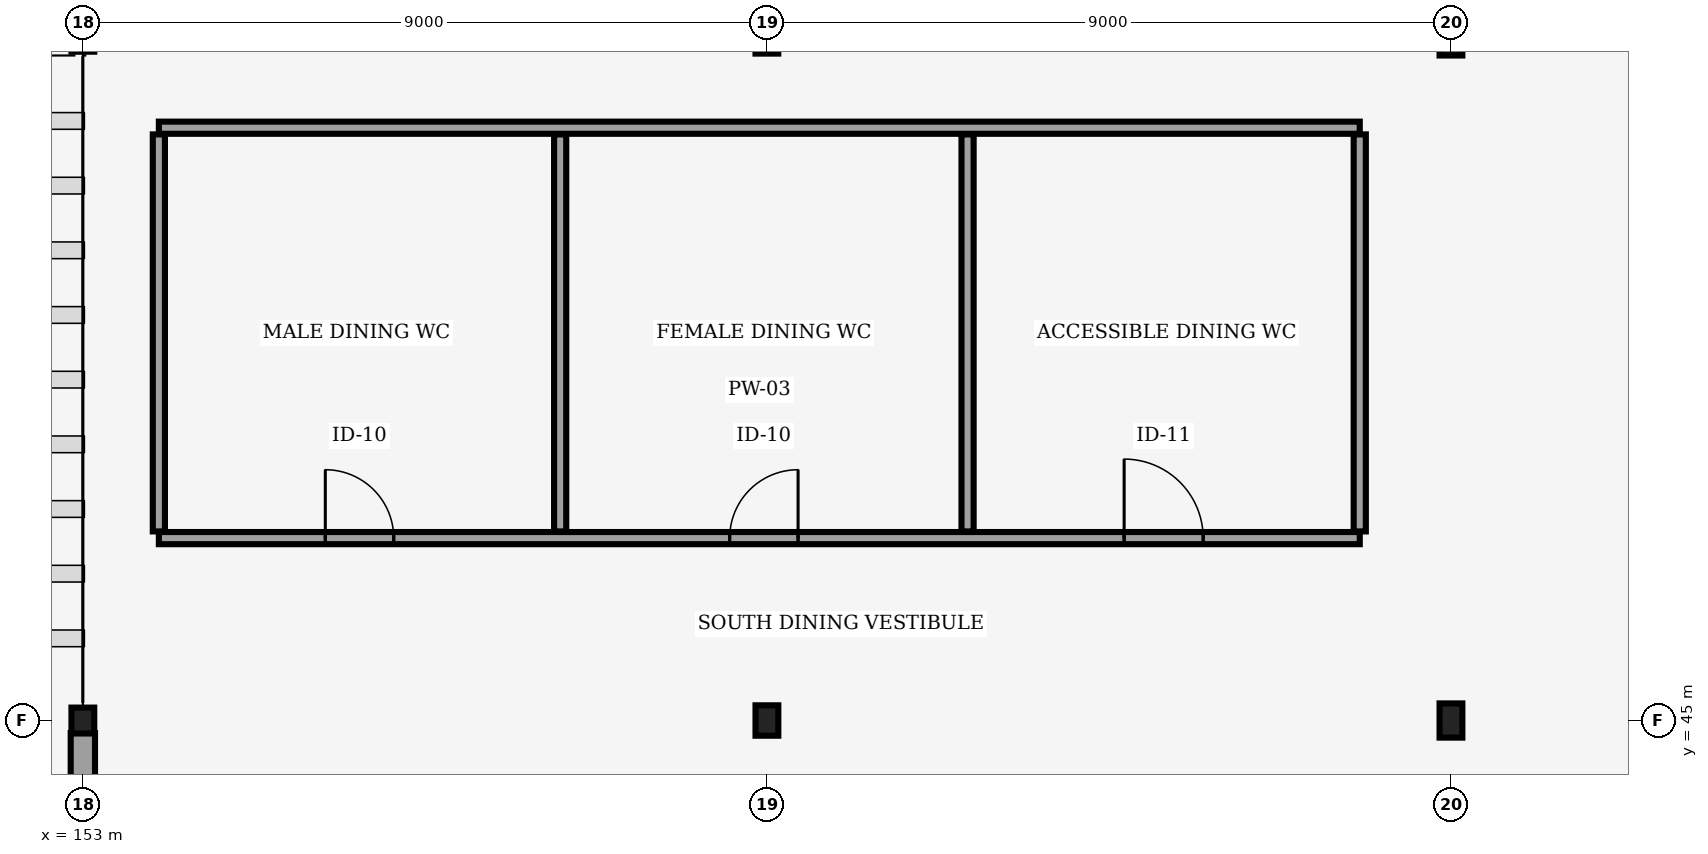
"""IFC4 building model, lengths in metres.
Left out: names, types, materials, properties, quantities, classifications, styles, units other than length and angle.
Written with IfcOpenShell. Run it as: python <this file> out.ifc"""

import sys

from ifc_helpers import new_model, si_unit, direction, frame, frame_2d, origin, origin_2d, place, context, subcontext, project, spatial, rectangle, i_section, extrude, element, fill, save


model = new_model("IFC4")
c1 = context("Model", 3, precision=1e-05, world=origin(), true_north=direction((0.0, 1.0)))
c2 = subcontext(c1, "Body", "Model", "MODEL_VIEW")
j1 = project(units=[si_unit("LENGTHUNIT", "METRE"), si_unit("PLANEANGLEUNIT", "RADIAN")], contexts=[c1])
p1 = place(None, origin())
s1 = spatial("IfcSite", under=j1, at=p1, CompositionType="ELEMENT")
p2 = place(p1, origin())
s2 = spatial("IfcBuilding", under=s1, at=p2, CompositionType="ELEMENT")
p3 = place(p2, frame((0.0, 0.0, 22.8)))
s3 = spatial("IfcBuildingStorey", under=s2, at=p3, CompositionType="ELEMENT", Elevation=22.8)
p4 = place(p3, frame((153.0, 45.0, 0.0), z_axis=(0.0, 0.0, 1.0), x_axis=(1.0, 0.0, 0.0)))
e1 = element("IfcColumn", 1, at=p4, inside=s3, PredefinedType="COLUMN", context=c2, shape_type="SweptSolid", body=[
    extrude(i_section(OverallWidth=0.3, OverallDepth=0.34, WebThickness=0.012, FlangeThickness=0.021, FilletRadius=0.027, at=origin_2d()), origin(), (0.0, 0.0, 1.0), 4.0),
])
p5 = place(p3, frame((162.0, 45.0, 0.0), z_axis=(0.0, 0.0, 1.0), x_axis=(1.0, 0.0, 0.0)))
e2 = element("IfcColumn", 2, at=p5, inside=s3, PredefinedType="COLUMN", context=c2, shape_type="SweptSolid", body=[
    extrude(i_section(OverallWidth=0.3, OverallDepth=0.4, WebThickness=0.013, FlangeThickness=0.024, FilletRadius=0.027, at=origin_2d()), origin(), (0.0, 0.0, 1.0), 4.0),
])
for number, where, z_axis, x_axis in (
    (3, (162.0, 54.0, 0.0), (0.0, 0.0, 1.0), (1.0, 0.0, 0.0)),
    (4, (171.0, 45.0, 0.0), (0.0, 0.0, 1.0), (1.0, 0.0, 0.0)),
):
    element("IfcColumn", number, at=place(p3, frame(where, z_axis=z_axis, x_axis=x_axis)), inside=s3, PredefinedType="COLUMN", context=c2, shape_type="SweptSolid", body=[
        extrude(i_section(OverallWidth=0.3, OverallDepth=0.45, WebThickness=0.014, FlangeThickness=0.026, FilletRadius=0.027, at=origin_2d()), origin(), (0.0, 0.0, 1.0), 4.0),
    ])
p6 = place(p3, frame((171.0, 54.0, 0.0), z_axis=(0.0, 0.0, 1.0), x_axis=(1.0, 0.0, 0.0)))
e5 = element("IfcColumn", 5, at=p6, inside=s3, PredefinedType="COLUMN", context=c2, shape_type="SweptSolid", body=[
    extrude(i_section(OverallWidth=0.3, OverallDepth=0.5, WebThickness=0.014, FlangeThickness=0.028, FilletRadius=0.027, at=origin_2d()), origin(), (0.0, 0.0, 1.0), 4.0),
])
p7 = place(p3, frame((153.0, 36.245, 0.0), z_axis=(0.0, 0.0, 1.0), x_axis=(0.0, 1.0, 0.0)))
e6 = element("IfcWall", 6, at=p7, inside=s3, PredefinedType="SOLIDWALL", context=c2, shape_type="SweptSolid", body=[
    extrude(rectangle(XDim=8.59, YDim=0.32, at=frame_2d((4.295, 0.0))), origin(), (0.0, 0.0, 1.0), 2.85),
])
p8 = place(p7, frame((2.715, 0.0, 0.0)))
e7 = element("IfcOpeningElement", 7, at=p8, cuts=e6, PredefinedType="OPENING", context=c2, shape_type="SweptSolid", body=[
    extrude(rectangle(XDim=1.85, YDim=2.3, at=frame_2d((0.925, 1.15))), frame((0.0, 0.17, 0.0), z_axis=(0.0, -1.0, 0.0), x_axis=(1.0, 0.0, 0.0)), (0.0, 0.0, 1.0), 0.34),
])
p9 = place(p7, frame((5.315, 0.0, 0.85)))
e8 = element("IfcOpeningElement", 8, at=p9, cuts=e6, PredefinedType="OPENING", context=c2, shape_type="SweptSolid", body=[
    extrude(rectangle(XDim=2.15, YDim=1.55, at=frame_2d((1.075, 0.775))), frame((0.0, 0.17, 0.0), z_axis=(0.0, -1.0, 0.0), x_axis=(1.0, 0.0, 0.0)), (0.0, 0.0, 1.0), 0.34),
])
p10 = place(p3, frame((154.0, 47.4, 0.0), z_axis=(0.0, 0.0, 1.0), x_axis=(1.0, 0.0, 0.0)))
e9 = element("IfcWall", 9, at=p10, inside=s3, PredefinedType="PLUMBINGWALL", context=c2, shape_type="SweptSolid", body=[
    extrude(rectangle(XDim=15.8, YDim=0.16, at=frame_2d((7.9, 0.0))), origin(), (0.0, 0.0, 1.0), 2.8),
])
p11 = place(p10, frame((2.19, 0.0, 0.0)))
e10 = element("IfcOpeningElement", 10, at=p11, cuts=e9, PredefinedType="OPENING", context=c2, shape_type="SweptSolid", body=[
    extrude(rectangle(XDim=0.9, YDim=2.1, at=frame_2d((0.45, 1.05))), frame((0.0, 0.09, 0.0), z_axis=(0.0, -1.0, 0.0), x_axis=(1.0, 0.0, 0.0)), (0.0, 0.0, 1.0), 0.18),
])
p12 = place(p10, frame((7.51, 0.0, 0.0)))
e11 = element("IfcOpeningElement", 11, at=p12, cuts=e9, PredefinedType="OPENING", context=c2, shape_type="SweptSolid", body=[
    extrude(rectangle(XDim=0.9, YDim=2.1, at=frame_2d((0.45, 1.05))), frame((0.0, 0.09, 0.0), z_axis=(0.0, -1.0, 0.0), x_axis=(1.0, 0.0, 0.0)), (0.0, 0.0, 1.0), 0.18),
])
p13 = place(p10, frame((12.7, 0.0, 0.0)))
e12 = element("IfcOpeningElement", 12, at=p13, cuts=e9, PredefinedType="OPENING", context=c2, shape_type="SweptSolid", body=[
    extrude(rectangle(XDim=1.04, YDim=2.15, at=frame_2d((0.52, 1.075))), frame((0.0, 0.09, 0.0), z_axis=(0.0, -1.0, 0.0), x_axis=(1.0, 0.0, 0.0)), (0.0, 0.0, 1.0), 0.18),
])
p14 = place(p3, frame((154.0, 52.8, 0.0), z_axis=(0.0, 0.0, 1.0), x_axis=(1.0, 0.0, 0.0)))
e13 = element("IfcWall", 13, at=p14, inside=s3, PredefinedType="PLUMBINGWALL", context=c2, shape_type="SweptSolid", body=[
    extrude(rectangle(XDim=15.8, YDim=0.16, at=frame_2d((7.9, 0.0))), origin(), (0.0, 0.0, 1.0), 2.8),
])
for number, where, z_axis, x_axis in (
    (14, (154.0, 47.488, 0.0), (0.0, 0.0, 1.0), (0.0, 1.0, 0.0)),
    (15, (159.28, 47.488, 0.0), (0.0, 0.0, 1.0), (0.0, 1.0, 0.0)),
    (16, (164.64, 47.488, 0.0), (0.0, 0.0, 1.0), (0.0, 1.0, 0.0)),
    (17, (169.8, 47.488, 0.0), (0.0, 0.0, 1.0), (0.0, 1.0, 0.0)),
):
    element("IfcWall", number, at=place(p3, frame(where, z_axis=z_axis, x_axis=x_axis)), inside=s3, PredefinedType="PLUMBINGWALL", context=c2, shape_type="SweptSolid", body=[
        extrude(rectangle(XDim=5.224, YDim=0.16, at=frame_2d((2.612, 0.0))), origin(), (0.0, 0.0, 1.0), 2.8),
    ])
p15 = place(p11, origin())
e18 = element("IfcDoor", 18, at=p15, inside=s3, OperationType="SINGLE_SWING_LEFT", PredefinedType="DOOR", context=c2, shape_type="SweptSolid", body=[
    extrude(rectangle(XDim=0.9, YDim=2.1, at=frame_2d((0.45, 1.05))), frame((0.0, 0.025, 0.0), z_axis=(0.0, -1.0, 0.0), x_axis=(1.0, 0.0, 0.0)), (0.0, 0.0, 1.0), 0.05),
])
fill(e10, e18)
p16 = place(p12, origin())
e19 = element("IfcDoor", 19, at=p16, inside=s3, OperationType="SINGLE_SWING_RIGHT", PredefinedType="DOOR", context=c2, shape_type="SweptSolid", body=[
    extrude(rectangle(XDim=0.9, YDim=2.1, at=frame_2d((0.45, 1.05))), frame((0.0, 0.025, 0.0), z_axis=(0.0, -1.0, 0.0), x_axis=(1.0, 0.0, 0.0)), (0.0, 0.0, 1.0), 0.05),
])
fill(e11, e19)
p17 = place(p13, origin())
e20 = element("IfcDoor", 20, at=p17, inside=s3, OperationType="SINGLE_SWING_LEFT", PredefinedType="DOOR", context=c2, shape_type="SweptSolid", body=[
    extrude(rectangle(XDim=1.04, YDim=2.15, at=frame_2d((0.52, 1.075))), frame((0.0, 0.025, 0.0), z_axis=(0.0, -1.0, 0.0), x_axis=(1.0, 0.0, 0.0)), (0.0, 0.0, 1.0), 0.05),
])
fill(e12, e20)
save(model, sys.argv[1])
